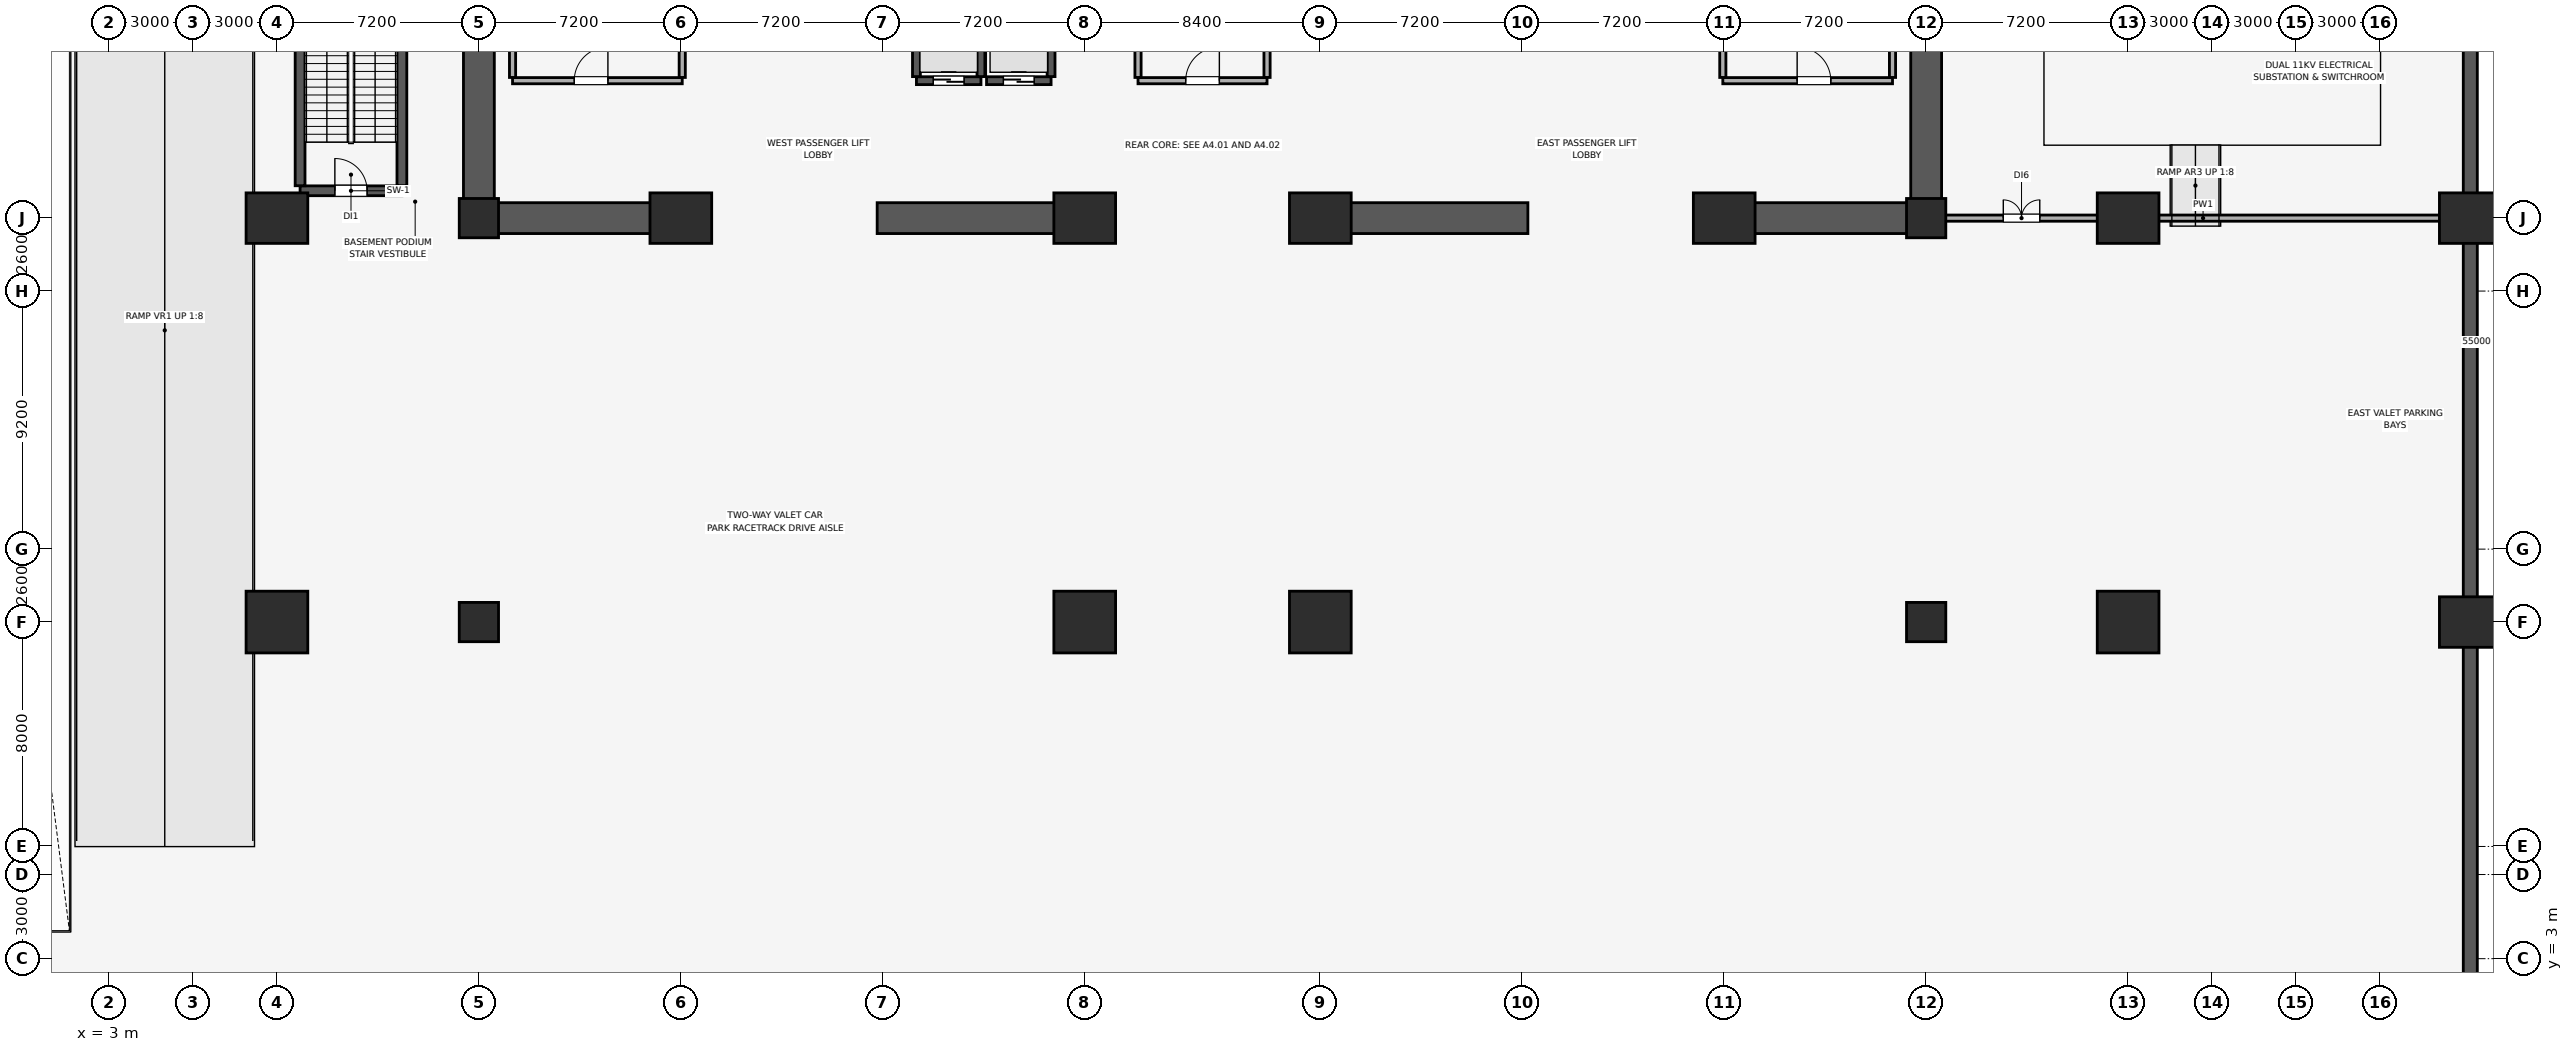
"""IFC4 building model, lengths in metres.
Left out: names, types, materials, properties, quantities, classifications, styles, units other than length and angle.
Written with IfcOpenShell. Run it as: python <this file> out.ifc"""

import sys

from ifc_helpers import new_model, si_unit, direction, frame, frame_2d, origin, origin_2d, place, context, subcontext, project, spatial, rectangle, circle, extrude, element, fill, save


model = new_model("IFC4")
c1 = context("Model", 3, precision=1e-05, world=origin(), true_north=direction((0.0, 1.0)))
c2 = subcontext(c1, "Body", "Model", "MODEL_VIEW")
j1 = project(units=[si_unit("LENGTHUNIT", "METRE"), si_unit("PLANEANGLEUNIT", "RADIAN")], contexts=[c1])
p1 = place(None, origin())
s1 = spatial("IfcSite", under=j1, at=p1, CompositionType="ELEMENT")
p2 = place(p1, origin())
s2 = spatial("IfcBuilding", under=s1, at=p2, CompositionType="ELEMENT")
p3 = place(p2, frame((0.0, 0.0, -4.6)))
s3 = spatial("IfcBuildingStorey", under=s2, at=p3, CompositionType="ELEMENT", Elevation=-4.6)
for number, where, z_axis, x_axis in (
    (1, (87.2, 15.0, 0.0), (0.0, 0.0, 1.0), (1.0, 0.0, 0.0)),
    (2, (87.2, 29.4, 0.0), (0.0, 0.0, 1.0), (1.0, 0.0, 0.0)),
):
    element("IfcColumn", number, at=place(p3, frame(where, z_axis=z_axis, x_axis=x_axis)), inside=s3, PredefinedType="USERDEFINED", context=c2, shape_type="SweptSolid", body=[
        extrude(rectangle(XDim=2.2, YDim=1.8, at=origin_2d()), origin(), (0.0, 0.0, 1.0), 4.25),
    ])
for number, where, z_axis, x_axis in (
    (3, (9.0, 15.0, 0.0), (0.0, 0.0, 1.0), (1.0, 0.0, 0.0)),
    (4, (37.8, 15.0, 0.0), (0.0, 0.0, 1.0), (1.0, 0.0, 0.0)),
    (5, (46.2, 15.0, 0.0), (0.0, 0.0, 1.0), (1.0, 0.0, 0.0)),
    (6, (75.0, 15.0, 0.0), (0.0, 0.0, 1.0), (1.0, 0.0, 0.0)),
):
    element("IfcColumn", number, at=place(p3, frame(where, z_axis=z_axis, x_axis=x_axis)), inside=s3, PredefinedType="USERDEFINED", context=c2, shape_type="SweptSolid", body=[
        extrude(circle(Radius=1.1, at=origin_2d()), origin(), (0.0, 0.0, 1.0), 4.25),
    ])
for number, where, z_axis, x_axis in (
    (7, (16.2, 15.0, 0.0), (0.0, 0.0, 1.0), (1.0, 0.0, 0.0)),
    (8, (67.8, 15.0, 0.0), (0.0, 0.0, 1.0), (1.0, 0.0, 0.0)),
):
    element("IfcColumn", number, at=place(p3, frame(where, z_axis=z_axis, x_axis=x_axis)), inside=s3, PredefinedType="COLUMN", context=c2, shape_type="SweptSolid", body=[
        extrude(rectangle(XDim=1.4, YDim=1.4, at=origin_2d()), origin(), (0.0, 0.0, 1.0), 4.25),
    ])
for number, where, z_axis, x_axis in (
    (9, (9.0, 29.4, 0.0), (0.0, 0.0, 1.0), (1.0, 0.0, 0.0)),
    (10, (23.4, 29.4, 0.0), (0.0, 0.0, 1.0), (1.0, 0.0, 0.0)),
    (11, (37.8, 29.4, 0.0), (0.0, 0.0, 1.0), (1.0, 0.0, 0.0)),
    (12, (46.2, 29.4, 0.0), (0.0, 0.0, 1.0), (1.0, 0.0, 0.0)),
    (13, (60.6, 29.4, 0.0), (0.0, 0.0, 1.0), (1.0, 0.0, 0.0)),
    (14, (75.0, 29.4, 0.0), (0.0, 0.0, 1.0), (1.0, 0.0, 0.0)),
):
    element("IfcColumn", number, at=place(p3, frame(where, z_axis=z_axis, x_axis=x_axis)), inside=s3, PredefinedType="USERDEFINED", context=c2, shape_type="SweptSolid", body=[
        extrude(rectangle(XDim=2.2, YDim=1.8, at=origin_2d()), origin(), (0.0, 0.0, 1.0), 4.25),
    ])
for number, where, z_axis, x_axis in (
    (15, (16.2, 29.4, 0.0), (0.0, 0.0, 1.0), (1.0, 0.0, 0.0)),
    (16, (67.8, 29.4, 0.0), (0.0, 0.0, 1.0), (1.0, 0.0, 0.0)),
):
    element("IfcColumn", number, at=place(p3, frame(where, z_axis=z_axis, x_axis=x_axis)), inside=s3, PredefinedType="COLUMN", context=c2, shape_type="SweptSolid", body=[
        extrude(rectangle(XDim=1.4, YDim=1.4, at=origin_2d()), origin(), (0.0, 0.0, 1.0), 4.25),
    ])
p4 = place(p3, frame((87.2, 1.1, 0.0), z_axis=(0.0, 0.0, 1.0), x_axis=(0.0, 1.0, 0.0)))
e17 = element("IfcWall", 17, at=p4, inside=s3, PredefinedType="USERDEFINED", context=c2, shape_type="SweptSolid", body=[
    extrude(rectangle(XDim=47.8, YDim=0.5, at=frame_2d((23.9, 0.0))), origin(), (0.0, 0.0, 1.0), 4.25),
])
for number, where, z_axis, x_axis in (
    (18, (16.2, 29.4, 0.0), (0.0, 0.0, 1.0), (0.0, 1.0, 0.0)),
    (19, (67.8, 29.4, 0.0), (0.0, 0.0, 1.0), (0.0, 1.0, 0.0)),
):
    element("IfcWall", number, at=place(p3, frame(where, z_axis=z_axis, x_axis=x_axis)), inside=s3, PredefinedType="SHEAR", context=c2, shape_type="SweptSolid", body=[
        extrude(rectangle(XDim=19.2, YDim=1.1, at=frame_2d((9.6, 0.0))), origin(), (0.0, 0.0, 1.0), 4.25),
    ])
p5 = place(p3, frame((16.755, 29.4, 0.0), z_axis=(0.0, 0.0, 1.0), x_axis=(1.0, 0.0, 0.0)))
e20 = element("IfcWall", 20, at=p5, inside=s3, PredefinedType="SHEAR", context=c2, shape_type="SweptSolid", body=[
    extrude(rectangle(XDim=6.845, YDim=1.1, at=frame_2d((3.423, 0.0))), origin(), (0.0, 0.0, 1.0), 4.25),
])
for number, where, z_axis, x_axis in (
    (21, (30.4, 29.4, 0.0), (0.0, 0.0, 1.0), (1.0, 0.0, 0.0)),
    (22, (46.0, 29.4, 0.0), (0.0, 0.0, 1.0), (1.0, 0.0, 0.0)),
):
    element("IfcWall", number, at=place(p3, frame(where, z_axis=z_axis, x_axis=x_axis)), inside=s3, PredefinedType="SHEAR", context=c2, shape_type="SweptSolid", body=[
        extrude(rectangle(XDim=7.6, YDim=1.1, at=frame_2d((3.8, 0.0))), origin(), (0.0, 0.0, 1.0), 4.25),
    ])
p6 = place(p3, frame((60.4, 29.4, 0.0), z_axis=(0.0, 0.0, 1.0), x_axis=(1.0, 0.0, 0.0)))
e23 = element("IfcWall", 23, at=p6, inside=s3, PredefinedType="SHEAR", context=c2, shape_type="SweptSolid", body=[
    extrude(rectangle(XDim=6.845, YDim=1.1, at=frame_2d((3.423, 0.0))), origin(), (0.0, 0.0, 1.0), 4.25),
])
p7 = place(p3, frame((9.825, 30.375, 0.0), z_axis=(0.0, 0.0, 1.0), x_axis=(1.0, 0.0, 0.0)))
e24 = element("IfcWall", 24, at=p7, inside=s3, PredefinedType="SHEAR", context=c2, shape_type="SweptSolid", body=[
    extrude(rectangle(XDim=3.63, YDim=0.35, at=frame_2d((1.815, 0.0))), origin(), (0.0, 0.0, 1.0), 4.25),
])
p8 = place(p7, frame((1.24, 0.0, 0.0)))
e25 = element("IfcOpeningElement", 25, at=p8, cuts=e24, PredefinedType="OPENING", context=c2, shape_type="SweptSolid", body=[
    extrude(rectangle(XDim=1.15, YDim=2.15, at=frame_2d((0.575, 1.075))), frame((0.0, 0.185, 0.0), z_axis=(0.0, -1.0, 0.0), x_axis=(1.0, 0.0, 0.0)), (0.0, 0.0, 1.0), 0.37),
])
p9 = place(p3, frame((9.825, 30.555, 0.0), z_axis=(0.0, 0.0, 1.0), x_axis=(0.0, 1.0, 0.0)))
e26 = element("IfcWall", 26, at=p9, inside=s3, PredefinedType="SHEAR", context=c2, shape_type="SweptSolid", body=[
    extrude(rectangle(XDim=8.435, YDim=0.35, at=frame_2d((4.218, 0.0))), origin(), (0.0, 0.0, 1.0), 4.25),
])
p10 = place(p3, frame((13.455, 30.555, 0.0), z_axis=(0.0, 0.0, 1.0), x_axis=(0.0, 1.0, 0.0)))
e27 = element("IfcWall", 27, at=p10, inside=s3, PredefinedType="SHEAR", context=c2, shape_type="SweptSolid", body=[
    extrude(rectangle(XDim=8.44, YDim=0.35, at=frame_2d((4.22, 0.0))), origin(), (0.0, 0.0, 1.0), 4.25),
])
p11 = place(p3, frame((31.8, 34.3, 0.0), z_axis=(0.0, 0.0, 1.0), x_axis=(1.0, 0.0, 0.0)))
e28 = element("IfcWall", 28, at=p11, inside=s3, PredefinedType="SHEAR", context=c2, shape_type="SweptSolid", body=[
    extrude(rectangle(XDim=2.3, YDim=0.28, at=frame_2d((1.15, 0.0))), origin(), (0.0, 0.0, 1.0), 4.25),
])
p12 = place(p11, frame((0.6, 0.0, 0.0)))
e29 = element("IfcOpeningElement", 29, at=p12, cuts=e28, PredefinedType="OPENING", context=c2, shape_type="SweptSolid", body=[
    extrude(rectangle(XDim=1.1, YDim=2.2, at=frame_2d((0.55, 1.1))), frame((0.0, 0.15, 0.0), z_axis=(0.0, -1.0, 0.0), x_axis=(1.0, 0.0, 0.0)), (0.0, 0.0, 1.0), 0.3),
])
for number, where, z_axis, x_axis in (
    (30, (31.8, 34.445, 0.0), (0.0, 0.0, 1.0), (0.0, 1.0, 0.0)),
    (31, (34.1, 34.445, 0.0), (0.0, 0.0, 1.0), (0.0, 1.0, 0.0)),
):
    element("IfcWall", number, at=place(p3, frame(where, z_axis=z_axis, x_axis=x_axis)), inside=s3, PredefinedType="SHEAR", context=c2, shape_type="SweptSolid", body=[
        extrude(rectangle(XDim=2.01, YDim=0.28, at=frame_2d((1.005, 0.0))), origin(), (0.0, 0.0, 1.0), 4.25),
    ])
p13 = place(p3, frame((34.3, 34.3, 0.0), z_axis=(0.0, 0.0, 1.0), x_axis=(1.0, 0.0, 0.0)))
e32 = element("IfcWall", 32, at=p13, inside=s3, PredefinedType="SHEAR", context=c2, shape_type="SweptSolid", body=[
    extrude(rectangle(XDim=2.3, YDim=0.28, at=frame_2d((1.15, 0.0))), origin(), (0.0, 0.0, 1.0), 4.25),
])
p14 = place(p13, frame((0.6, 0.0, 0.0)))
e33 = element("IfcOpeningElement", 33, at=p14, cuts=e32, PredefinedType="OPENING", context=c2, shape_type="SweptSolid", body=[
    extrude(rectangle(XDim=1.1, YDim=2.2, at=frame_2d((0.55, 1.1))), frame((0.0, 0.15, 0.0), z_axis=(0.0, -1.0, 0.0), x_axis=(1.0, 0.0, 0.0)), (0.0, 0.0, 1.0), 0.3),
])
p15 = place(p3, frame((36.6, 34.445, 0.0), z_axis=(0.0, 0.0, 1.0), x_axis=(0.0, 1.0, 0.0)))
e34 = element("IfcWall", 34, at=p15, inside=s3, PredefinedType="SHEAR", context=c2, shape_type="SweptSolid", body=[
    extrude(rectangle(XDim=2.01, YDim=0.28, at=frame_2d((1.005, 0.0))), origin(), (0.0, 0.0, 1.0), 4.25),
])
p16 = place(p3, frame((17.4, 34.3, 0.0), z_axis=(0.0, 0.0, 1.0), x_axis=(1.0, 0.0, 0.0)))
e35 = element("IfcWall", 35, at=p16, inside=s3, PredefinedType="PARTITIONING", context=c2, shape_type="SweptSolid", body=[
    extrude(rectangle(XDim=6.05, YDim=0.22, at=frame_2d((3.025, 0.0))), origin(), (0.0, 0.0, 1.0), 4.25),
])
p17 = place(p16, frame((2.2, 0.0, 0.0)))
e36 = element("IfcOpeningElement", 36, at=p17, cuts=e35, PredefinedType="OPENING", context=c2, shape_type="SweptSolid", body=[
    extrude(rectangle(XDim=1.2, YDim=2.15, at=frame_2d((0.6, 1.075))), frame((0.0, 0.12, 0.0), z_axis=(0.0, -1.0, 0.0), x_axis=(1.0, 0.0, 0.0)), (0.0, 0.0, 1.0), 0.24),
])
p18 = place(p3, frame((17.4, 34.415, 0.0), z_axis=(0.0, 0.0, 1.0), x_axis=(0.0, 1.0, 0.0)))
e37 = element("IfcWall", 37, at=p18, inside=s3, PredefinedType="PARTITIONING", context=c2, shape_type="SweptSolid", body=[
    extrude(rectangle(XDim=5.43, YDim=0.22, at=frame_2d((2.715, 0.0))), origin(), (0.0, 0.0, 1.0), 4.25),
])
p19 = place(p3, frame((23.45, 34.415, 0.0), z_axis=(0.0, 0.0, 1.0), x_axis=(0.0, 1.0, 0.0)))
e38 = element("IfcWall", 38, at=p19, inside=s3, PredefinedType="PARTITIONING", context=c2, shape_type="SweptSolid", body=[
    extrude(rectangle(XDim=5.64, YDim=0.22, at=frame_2d((2.82, 0.0))), origin(), (0.0, 0.0, 1.0), 4.25),
])
p20 = place(p3, frame((60.55, 34.3, 0.0), z_axis=(0.0, 0.0, 1.0), x_axis=(1.0, 0.0, 0.0)))
e39 = element("IfcWall", 39, at=p20, inside=s3, PredefinedType="PARTITIONING", context=c2, shape_type="SweptSolid", body=[
    extrude(rectangle(XDim=6.05, YDim=0.22, at=frame_2d((3.025, 0.0))), origin(), (0.0, 0.0, 1.0), 4.25),
])
p21 = place(p20, frame((2.65, 0.0, 0.0)))
e40 = element("IfcOpeningElement", 40, at=p21, cuts=e39, PredefinedType="OPENING", context=c2, shape_type="SweptSolid", body=[
    extrude(rectangle(XDim=1.2, YDim=2.15, at=frame_2d((0.6, 1.075))), frame((0.0, 0.12, 0.0), z_axis=(0.0, -1.0, 0.0), x_axis=(1.0, 0.0, 0.0)), (0.0, 0.0, 1.0), 0.24),
])
p22 = place(p3, frame((60.55, 34.415, 0.0), z_axis=(0.0, 0.0, 1.0), x_axis=(0.0, 1.0, 0.0)))
e41 = element("IfcWall", 41, at=p22, inside=s3, PredefinedType="PARTITIONING", context=c2, shape_type="SweptSolid", body=[
    extrude(rectangle(XDim=5.64, YDim=0.22, at=frame_2d((2.82, 0.0))), origin(), (0.0, 0.0, 1.0), 4.25),
])
p23 = place(p3, frame((66.6, 34.415, 0.0), z_axis=(0.0, 0.0, 1.0), x_axis=(0.0, 1.0, 0.0)))
e42 = element("IfcWall", 42, at=p23, inside=s3, PredefinedType="PARTITIONING", context=c2, shape_type="SweptSolid", body=[
    extrude(rectangle(XDim=5.43, YDim=0.22, at=frame_2d((2.715, 0.0))), origin(), (0.0, 0.0, 1.0), 4.25),
])
p24 = place(p3, frame((39.7, 34.3, 0.0), z_axis=(0.0, 0.0, 1.0), x_axis=(1.0, 0.0, 0.0)))
e43 = element("IfcWall", 43, at=p24, inside=s3, PredefinedType="PARTITIONING", context=c2, shape_type="SweptSolid", body=[
    extrude(rectangle(XDim=4.6, YDim=0.22, at=frame_2d((2.3, 0.0))), origin(), (0.0, 0.0, 1.0), 4.25),
])
p25 = place(p24, frame((1.7, 0.0, 0.0)))
e44 = element("IfcOpeningElement", 44, at=p25, cuts=e43, PredefinedType="OPENING", context=c2, shape_type="SweptSolid", body=[
    extrude(rectangle(XDim=1.2, YDim=2.15, at=frame_2d((0.6, 1.075))), frame((0.0, 0.12, 0.0), z_axis=(0.0, -1.0, 0.0), x_axis=(1.0, 0.0, 0.0)), (0.0, 0.0, 1.0), 0.24),
])
for number, where, z_axis, x_axis in (
    (45, (39.7, 34.415, 0.0), (0.0, 0.0, 1.0), (0.0, 1.0, 0.0)),
    (46, (44.3, 34.415, 0.0), (0.0, 0.0, 1.0), (0.0, 1.0, 0.0)),
):
    element("IfcWall", number, at=place(p3, frame(where, z_axis=z_axis, x_axis=x_axis)), inside=s3, PredefinedType="PARTITIONING", context=c2, shape_type="SweptSolid", body=[
        extrude(rectangle(XDim=5.785, YDim=0.22, at=frame_2d((2.893, 0.0))), origin(), (0.0, 0.0, 1.0), 4.25),
    ])
p26 = place(p3, frame((68.4, 29.4, 0.0), z_axis=(0.0, 0.0, 1.0), x_axis=(1.0, 0.0, 0.0)))
e47 = element("IfcWall", 47, at=p26, inside=s3, PredefinedType="PARTITIONING", context=c2, shape_type="SweptSolid", body=[
    extrude(rectangle(XDim=18.545, YDim=0.22, at=frame_2d((9.272, 0.0))), origin(), (0.0, 0.0, 1.0), 3.45),
])
p27 = place(p26, frame((2.15, 0.0, 0.0)))
e48 = element("IfcOpeningElement", 48, at=p27, cuts=e47, PredefinedType="OPENING", context=c2, shape_type="SweptSolid", body=[
    extrude(rectangle(XDim=1.3, YDim=2.2, at=frame_2d((0.65, 1.1))), frame((0.0, 0.12, 0.0), z_axis=(0.0, -1.0, 0.0), x_axis=(1.0, 0.0, 0.0)), (0.0, 0.0, 1.0), 0.24),
])
p28 = place(p8, origin())
e49 = element("IfcDoor", 49, at=p28, inside=s3, OperationType="SINGLE_SWING_LEFT", PredefinedType="DOOR", context=c2, shape_type="SweptSolid", body=[
    extrude(rectangle(XDim=1.15, YDim=2.15, at=frame_2d((0.575, 1.075))), frame((0.0, 0.025, 0.0), z_axis=(0.0, -1.0, 0.0), x_axis=(1.0, 0.0, 0.0)), (0.0, 0.0, 1.0), 0.05),
])
fill(e25, e49)
p29 = place(p12, origin())
e50 = element("IfcDoor", 50, at=p29, inside=s3, OperationType="DOUBLE_DOOR_SLIDING", PredefinedType="DOOR", context=c2, shape_type="SweptSolid", body=[
    extrude(rectangle(XDim=1.1, YDim=2.2, at=frame_2d((0.55, 1.1))), frame((0.0, 0.025, 0.0), z_axis=(0.0, -1.0, 0.0), x_axis=(1.0, 0.0, 0.0)), (0.0, 0.0, 1.0), 0.05),
])
fill(e29, e50)
p30 = place(p14, origin())
e51 = element("IfcDoor", 51, at=p30, inside=s3, OperationType="DOUBLE_DOOR_SLIDING", PredefinedType="DOOR", context=c2, shape_type="SweptSolid", body=[
    extrude(rectangle(XDim=1.1, YDim=2.2, at=frame_2d((0.55, 1.1))), frame((0.0, 0.025, 0.0), z_axis=(0.0, -1.0, 0.0), x_axis=(1.0, 0.0, 0.0)), (0.0, 0.0, 1.0), 0.05),
])
fill(e33, e51)
p31 = place(p17, origin())
e52 = element("IfcDoor", 52, at=p31, inside=s3, OperationType="SINGLE_SWING_RIGHT", PredefinedType="DOOR", context=c2, shape_type="SweptSolid", body=[
    extrude(rectangle(XDim=1.2, YDim=2.15, at=frame_2d((0.6, 1.075))), frame((0.0, 0.025, 0.0), z_axis=(0.0, -1.0, 0.0), x_axis=(1.0, 0.0, 0.0)), (0.0, 0.0, 1.0), 0.05),
])
fill(e36, e52)
p32 = place(p21, origin())
e53 = element("IfcDoor", 53, at=p32, inside=s3, OperationType="SINGLE_SWING_LEFT", PredefinedType="DOOR", context=c2, shape_type="SweptSolid", body=[
    extrude(rectangle(XDim=1.2, YDim=2.15, at=frame_2d((0.6, 1.075))), frame((0.0, 0.025, 0.0), z_axis=(0.0, -1.0, 0.0), x_axis=(1.0, 0.0, 0.0)), (0.0, 0.0, 1.0), 0.05),
])
fill(e40, e53)
p33 = place(p25, origin())
e54 = element("IfcDoor", 54, at=p33, inside=s3, OperationType="SINGLE_SWING_RIGHT", PredefinedType="DOOR", context=c2, shape_type="SweptSolid", body=[
    extrude(rectangle(XDim=1.2, YDim=2.15, at=frame_2d((0.6, 1.075))), frame((0.0, 0.025, 0.0), z_axis=(0.0, -1.0, 0.0), x_axis=(1.0, 0.0, 0.0)), (0.0, 0.0, 1.0), 0.05),
])
fill(e44, e54)
p34 = place(p27, origin())
e55 = element("IfcDoor", 55, at=p34, inside=s3, OperationType="DOUBLE_DOOR_SINGLE_SWING", PredefinedType="DOOR", context=c2, shape_type="SweptSolid", body=[
    extrude(rectangle(XDim=1.3, YDim=2.2, at=frame_2d((0.65, 1.1))), frame((0.0, 0.025, 0.0), z_axis=(0.0, -1.0, 0.0), x_axis=(1.0, 0.0, 0.0)), (0.0, 0.0, 1.0), 0.05),
])
fill(e48, e55)
save(model, sys.argv[1])
